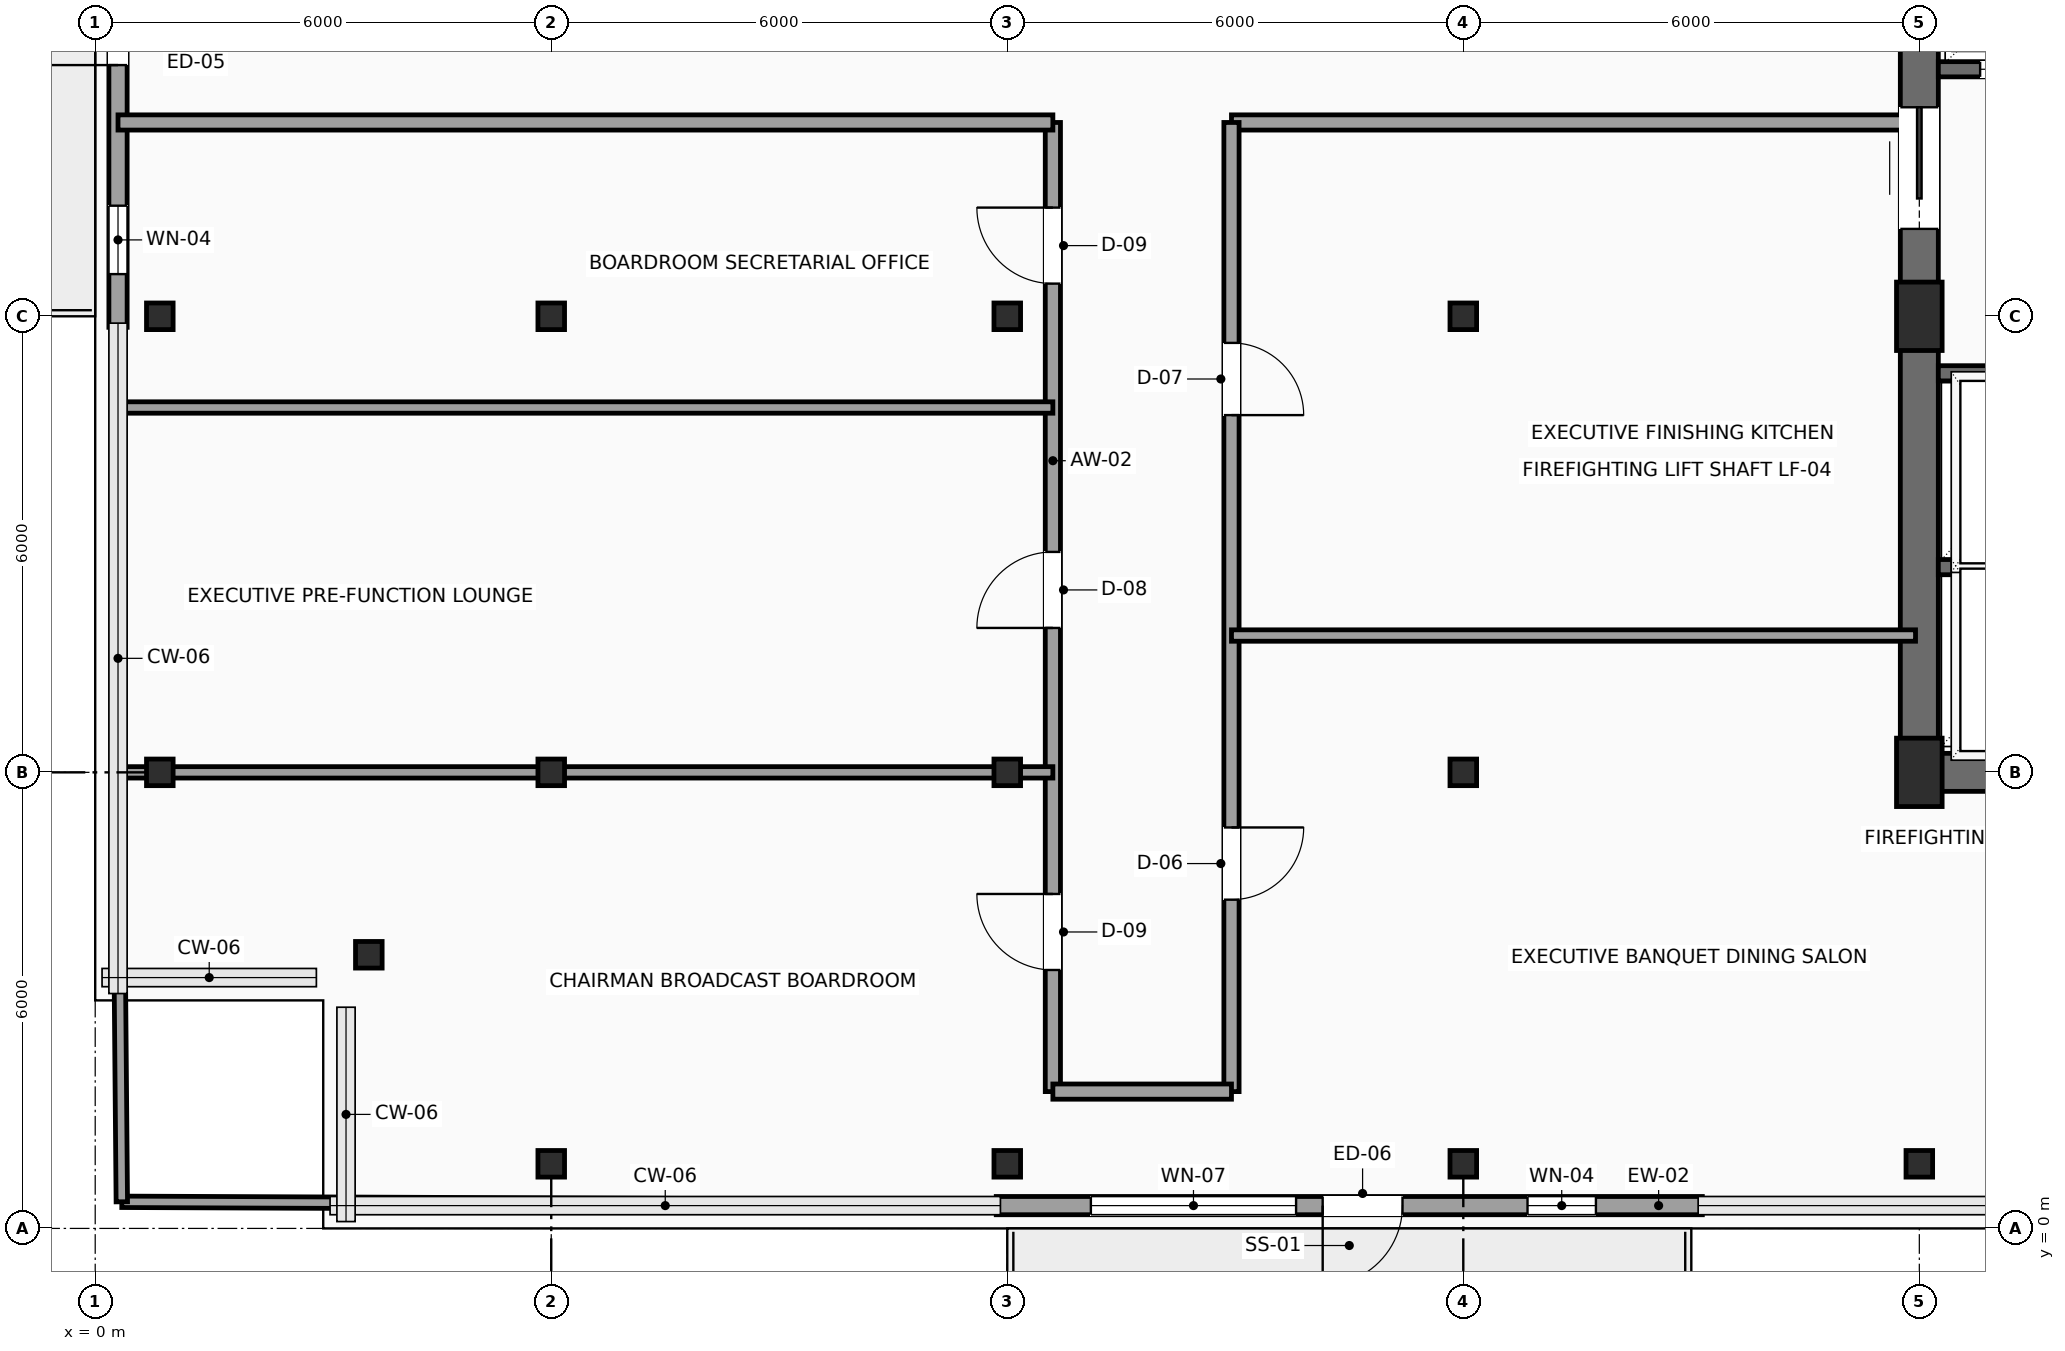
"""IFC4 building model, lengths in metres.
Left out: names, types, materials, properties, quantities, classifications, styles, units other than length and angle.
Written with IfcOpenShell. Run it as: python <this file> out.ifc"""

import sys

from ifc_helpers import new_model, si_unit, direction, frame, frame_2d, origin, origin_2d, place, context, subcontext, project, spatial, rectangle, hollow_rectangle, extrude, element, fill, save


model = new_model("IFC4")
c1 = context("Model", 3, precision=1e-05, world=origin(), true_north=direction((0.0, 1.0)))
c2 = subcontext(c1, "Body", "Model", "MODEL_VIEW")
j1 = project(units=[si_unit("LENGTHUNIT", "METRE"), si_unit("PLANEANGLEUNIT", "RADIAN")], contexts=[c1])
p1 = place(None, origin())
s1 = spatial("IfcSite", under=j1, at=p1, CompositionType="ELEMENT")
p2 = place(p1, origin())
s2 = spatial("IfcBuilding", under=s1, at=p2, CompositionType="ELEMENT")
p3 = place(p2, frame((0.0, 0.0, 292.2)))
s3 = spatial("IfcBuildingStorey", under=s2, at=p3, CompositionType="ELEMENT", Elevation=292.2)
for number, where, z_axis, x_axis in (
    (1, (24.0, 6.0, 0.0), (0.0, 0.0, 1.0), (1.0, 0.0, 0.0)),
    (2, (24.0, 12.0, 0.0), (0.0, 0.0, 1.0), (1.0, 0.0, 0.0)),
):
    element("IfcColumn", number, at=place(p3, frame(where, z_axis=z_axis, x_axis=x_axis)), inside=s3, PredefinedType="COLUMN", context=c2, shape_type="SweptSolid", body=[
        extrude(rectangle(XDim=0.6, YDim=0.9, at=origin_2d()), origin(), (0.0, 0.0, 1.0), 4.2),
    ])
for number, where, z_axis, x_axis in (
    (3, (3.6, 3.6, 0.0), (0.0, 0.0, 1.0), (1.0, 0.0, 0.0)),
    (4, (0.85, 6.0, 0.0), (0.0, 0.0, 1.0), (1.0, 0.0, 0.0)),
    (5, (0.85, 12.0, 0.0), (0.0, 0.0, 1.0), (1.0, 0.0, 0.0)),
    (6, (6.0, 0.85, 0.0), (0.0, 0.0, 1.0), (1.0, 0.0, 0.0)),
    (7, (6.0, 6.0, 0.0), (0.0, 0.0, 1.0), (1.0, 0.0, 0.0)),
    (8, (6.0, 12.0, 0.0), (0.0, 0.0, 1.0), (1.0, 0.0, 0.0)),
    (9, (12.0, 0.85, 0.0), (0.0, 0.0, 1.0), (1.0, 0.0, 0.0)),
    (10, (12.0, 6.0, 0.0), (0.0, 0.0, 1.0), (1.0, 0.0, 0.0)),
    (11, (12.0, 12.0, 0.0), (0.0, 0.0, 1.0), (1.0, 0.0, 0.0)),
    (12, (18.0, 0.85, 0.0), (0.0, 0.0, 1.0), (1.0, 0.0, 0.0)),
    (13, (18.0, 6.0, 0.0), (0.0, 0.0, 1.0), (1.0, 0.0, 0.0)),
    (14, (18.0, 12.0, 0.0), (0.0, 0.0, 1.0), (1.0, 0.0, 0.0)),
    (15, (24.0, 0.85, 0.0), (0.0, 0.0, 1.0), (1.0, 0.0, 0.0)),
):
    element("IfcColumn", number, at=place(p3, frame(where, z_axis=z_axis, x_axis=x_axis)), inside=s3, PredefinedType="COLUMN", context=c2, shape_type="SweptSolid", body=[
        extrude(hollow_rectangle(XDim=0.35, YDim=0.35, WallThickness=0.016, InnerFilletRadius=0.016, OuterFilletRadius=0.032, at=origin_2d()), origin(), (0.0, 0.0, 1.0), 4.2),
    ])
p4 = place(p3, frame((21.145, 0.3, 0.0), z_axis=(0.0, 0.0, 1.0), x_axis=(-1.0, 0.0, 0.0)))
e16 = element("IfcWall", 16, at=p4, inside=s3, PredefinedType="SOLIDWALL", context=c2, shape_type="SweptSolid", body=[
    extrude(rectangle(XDim=9.29, YDim=0.24, at=frame_2d((4.645, 0.0))), origin(), (0.0, 0.0, 1.0), 4.0),
])
p5 = place(p4, frame((3.945, 0.0, 0.0)))
e17 = element("IfcOpeningElement", 17, at=p5, cuts=e16, PredefinedType="OPENING", context=c2, shape_type="SweptSolid", body=[
    extrude(rectangle(XDim=1.05, YDim=2.2, at=frame_2d((0.525, 1.1))), frame((0.0, 0.13, 0.0), z_axis=(0.0, -1.0, 0.0), x_axis=(1.0, 0.0, 0.0)), (0.0, 0.0, 1.0), 0.26),
])
p6 = place(p4, frame((5.345, 0.0, 0.6)))
e18 = element("IfcOpeningElement", 18, at=p6, cuts=e16, PredefinedType="OPENING", context=c2, shape_type="SweptSolid", body=[
    extrude(rectangle(XDim=2.7, YDim=2.3, at=frame_2d((1.35, 1.15))), frame((0.0, 0.13, 0.0), z_axis=(0.0, -1.0, 0.0), x_axis=(1.0, 0.0, 0.0)), (0.0, 0.0, 1.0), 0.26),
])
p7 = place(p4, frame((1.4, 0.0, 0.6)))
e19 = element("IfcOpeningElement", 19, at=p7, cuts=e16, PredefinedType="OPENING", context=c2, shape_type="SweptSolid", body=[
    extrude(rectangle(XDim=0.9, YDim=2.2, at=frame_2d((0.45, 1.1))), frame((0.0, 0.13, 0.0), z_axis=(0.0, -1.0, 0.0), x_axis=(1.0, 0.0, 0.0)), (0.0, 0.0, 1.0), 0.26),
])
p8 = place(p3, frame((0.3, 11.855, 0.0), z_axis=(0.0, 0.0, 1.0), x_axis=(0.0, 1.0, 0.0)))
e20 = element("IfcWall", 20, at=p8, inside=s3, PredefinedType="SOLIDWALL", context=c2, shape_type="SweptSolid", body=[
    extrude(rectangle(XDim=9.29, YDim=0.24, at=frame_2d((4.645, 0.0))), origin(), (0.0, 0.0, 1.0), 4.0),
])
p9 = place(p8, frame((3.45, 0.0, 0.0)))
e21 = element("IfcOpeningElement", 21, at=p9, cuts=e20, PredefinedType="OPENING", context=c2, shape_type="SweptSolid", body=[
    extrude(rectangle(XDim=1.05, YDim=2.2, at=frame_2d((0.525, 1.1))), frame((0.0, 0.13, 0.0), z_axis=(0.0, -1.0, 0.0), x_axis=(1.0, 0.0, 0.0)), (0.0, 0.0, 1.0), 0.26),
])
p10 = place(p8, frame((5.6, 0.0, 0.6)))
e22 = element("IfcOpeningElement", 22, at=p10, cuts=e20, PredefinedType="OPENING", context=c2, shape_type="SweptSolid", body=[
    extrude(rectangle(XDim=2.7, YDim=2.3, at=frame_2d((1.35, 1.15))), frame((0.0, 0.13, 0.0), z_axis=(0.0, -1.0, 0.0), x_axis=(1.0, 0.0, 0.0)), (0.0, 0.0, 1.0), 0.26),
])
p11 = place(p8, frame((0.7, 0.0, 0.6)))
e23 = element("IfcOpeningElement", 23, at=p11, cuts=e20, PredefinedType="OPENING", context=c2, shape_type="SweptSolid", body=[
    extrude(rectangle(XDim=0.9, YDim=2.2, at=frame_2d((0.45, 1.1))), frame((0.0, 0.13, 0.0), z_axis=(0.0, -1.0, 0.0), x_axis=(1.0, 0.0, 0.0)), (0.0, 0.0, 1.0), 0.26),
])
p12 = place(p3, frame((24.0, 6.0, 0.0), z_axis=(0.0, 0.0, 1.0), x_axis=(1.0, 0.0, 0.0)))
e24 = element("IfcWall", 24, at=p12, inside=s3, PredefinedType="SHEAR", context=c2, shape_type="SweptSolid", body=[
    extrude(rectangle(XDim=9.6, YDim=0.5, at=frame_2d((4.8, 0.0))), origin(), (0.0, 0.0, 1.0), 4.0),
])
p13 = place(p3, frame((24.0, 6.0, 0.0), z_axis=(0.0, 0.0, 1.0), x_axis=(0.0, 1.0, 0.0)))
e25 = element("IfcWall", 25, at=p13, inside=s3, PredefinedType="SHEAR", context=c2, shape_type="SweptSolid", body=[
    extrude(rectangle(XDim=12.0, YDim=0.5, at=frame_2d((6.0, 0.0))), origin(), (0.0, 0.0, 1.0), 4.0),
])
p14 = place(p13, frame((7.15, 0.0, 0.0)))
e26 = element("IfcOpeningElement", 26, at=p14, cuts=e25, PredefinedType="OPENING", context=c2, shape_type="SweptSolid", body=[
    extrude(rectangle(XDim=1.6, YDim=2.3, at=frame_2d((0.8, 1.15))), frame((0.0, 0.26, 0.0), z_axis=(0.0, -1.0, 0.0), x_axis=(1.0, 0.0, 0.0)), (0.0, 0.0, 1.0), 0.52),
])
for number, where, z_axis, x_axis in (
    (27, (24.25, 8.7, 0.0), (0.0, 0.0, 1.0), (1.0, 0.0, 0.0)),
    (28, (24.25, 11.25, 0.0), (0.0, 0.0, 1.0), (1.0, 0.0, 0.0)),
):
    element("IfcWall", number, at=place(p3, frame(where, z_axis=z_axis, x_axis=x_axis)), inside=s3, PredefinedType="SHEAR", context=c2, shape_type="SweptSolid", body=[
        extrude(rectangle(XDim=2.17, YDim=0.2, at=frame_2d((1.085, 0.0))), origin(), (0.0, 0.0, 1.0), 4.0),
    ])
p15 = place(p3, frame((24.25, 15.25, 0.0), z_axis=(0.0, 0.0, 1.0), x_axis=(1.0, 0.0, 0.0)))
e29 = element("IfcWall", 29, at=p15, inside=s3, PredefinedType="SHEAR", context=c2, shape_type="SweptSolid", body=[
    extrude(rectangle(XDim=5.2, YDim=0.2, at=frame_2d((2.6, 0.0))), origin(), (0.0, 0.0, 1.0), 4.0),
])
p16 = place(p15, frame((0.55, 0.0, 0.0)))
e30 = element("IfcOpeningElement", 30, at=p16, cuts=e29, PredefinedType="OPENING", context=c2, shape_type="SweptSolid", body=[
    extrude(rectangle(XDim=1.2, YDim=2.2, at=frame_2d((0.6, 1.1))), frame((0.0, 0.11, 0.0), z_axis=(0.0, -1.0, 0.0), x_axis=(1.0, 0.0, 0.0)), (0.0, 0.0, 1.0), 0.22),
])
p17 = place(p15, frame((3.15, 0.0, 0.0)))
e31 = element("IfcOpeningElement", 31, at=p17, cuts=e29, PredefinedType="OPENING", context=c2, shape_type="SweptSolid", body=[
    extrude(rectangle(XDim=1.2, YDim=2.2, at=frame_2d((0.6, 1.1))), frame((0.0, 0.11, 0.0), z_axis=(0.0, -1.0, 0.0), x_axis=(1.0, 0.0, 0.0)), (0.0, 0.0, 1.0), 0.22),
])
p18 = place(p3, frame((12.6, 1.8, 0.0), z_axis=(0.0, 0.0, 1.0), x_axis=(0.0, 1.0, 0.0)))
e32 = element("IfcWall", 32, at=p18, inside=s3, PredefinedType="PARTITIONING", context=c2, shape_type="SweptSolid", body=[
    extrude(rectangle(XDim=12.75, YDim=0.2, at=frame_2d((6.375, 0.0))), origin(), (0.0, 0.0, 1.0), 4.0),
])
p19 = place(p18, frame((1.6, 0.0, 0.0)))
e33 = element("IfcOpeningElement", 33, at=p19, cuts=e32, PredefinedType="OPENING", context=c2, shape_type="SweptSolid", body=[
    extrude(rectangle(XDim=1.0, YDim=2.2, at=frame_2d((0.5, 1.1))), frame((0.0, 0.11, 0.0), z_axis=(0.0, -1.0, 0.0), x_axis=(1.0, 0.0, 0.0)), (0.0, 0.0, 1.0), 0.22),
])
p20 = place(p18, frame((6.1, 0.0, 0.0)))
e34 = element("IfcOpeningElement", 34, at=p20, cuts=e32, PredefinedType="OPENING", context=c2, shape_type="SweptSolid", body=[
    extrude(rectangle(XDim=1.0, YDim=2.2, at=frame_2d((0.5, 1.1))), frame((0.0, 0.11, 0.0), z_axis=(0.0, -1.0, 0.0), x_axis=(1.0, 0.0, 0.0)), (0.0, 0.0, 1.0), 0.22),
])
p21 = place(p18, frame((10.63, 0.0, 0.0)))
e35 = element("IfcOpeningElement", 35, at=p21, cuts=e32, PredefinedType="OPENING", context=c2, shape_type="SweptSolid", body=[
    extrude(rectangle(XDim=1.0, YDim=2.2, at=frame_2d((0.5, 1.1))), frame((0.0, 0.11, 0.0), z_axis=(0.0, -1.0, 0.0), x_axis=(1.0, 0.0, 0.0)), (0.0, 0.0, 1.0), 0.22),
])
p22 = place(p3, frame((12.6, 14.55, 0.0), z_axis=(0.0, 0.0, 1.0), x_axis=(-1.0, 0.0, 0.0)))
e36 = element("IfcWall", 36, at=p22, inside=s3, PredefinedType="PARTITIONING", context=c2, shape_type="SweptSolid", body=[
    extrude(rectangle(XDim=12.3, YDim=0.2, at=frame_2d((6.15, 0.0))), origin(), (0.0, 0.0, 1.0), 4.0),
])
p23 = place(p3, frame((23.95, 14.55, 0.0), z_axis=(0.0, 0.0, 1.0), x_axis=(-1.0, 0.0, 0.0)))
e37 = element("IfcWall", 37, at=p23, inside=s3, PredefinedType="PARTITIONING", context=c2, shape_type="SweptSolid", body=[
    extrude(rectangle(XDim=9.0, YDim=0.2, at=frame_2d((4.5, 0.0))), origin(), (0.0, 0.0, 1.0), 4.0),
])
p24 = place(p3, frame((14.95, 14.55, 0.0), z_axis=(0.0, 0.0, 1.0), x_axis=(0.0, -1.0, 0.0)))
e38 = element("IfcWall", 38, at=p24, inside=s3, PredefinedType="PARTITIONING", context=c2, shape_type="SweptSolid", body=[
    extrude(rectangle(XDim=12.75, YDim=0.2, at=frame_2d((6.375, 0.0))), origin(), (0.0, 0.0, 1.0), 4.0),
])
p25 = place(p24, frame((9.275, 0.0, 0.0)))
e39 = element("IfcOpeningElement", 39, at=p25, cuts=e38, PredefinedType="OPENING", context=c2, shape_type="SweptSolid", body=[
    extrude(rectangle(XDim=0.95, YDim=2.15, at=frame_2d((0.475, 1.075))), frame((0.0, 0.11, 0.0), z_axis=(0.0, -1.0, 0.0), x_axis=(1.0, 0.0, 0.0)), (0.0, 0.0, 1.0), 0.22),
])
p26 = place(p24, frame((2.9, 0.0, 0.0)))
e40 = element("IfcOpeningElement", 40, at=p26, cuts=e38, PredefinedType="OPENING", context=c2, shape_type="SweptSolid", body=[
    extrude(rectangle(XDim=0.95, YDim=2.15, at=frame_2d((0.475, 1.075))), frame((0.0, 0.11, 0.0), z_axis=(0.0, -1.0, 0.0), x_axis=(1.0, 0.0, 0.0)), (0.0, 0.0, 1.0), 0.22),
])
p27 = place(p3, frame((14.95, 1.8, 0.0), z_axis=(0.0, 0.0, 1.0), x_axis=(-1.0, 0.0, 0.0)))
e41 = element("IfcWall", 41, at=p27, inside=s3, PredefinedType="PARTITIONING", context=c2, shape_type="SweptSolid", body=[
    extrude(rectangle(XDim=2.35, YDim=0.2, at=frame_2d((1.175, 0.0))), origin(), (0.0, 0.0, 1.0), 4.0),
])
p28 = place(p3, frame((0.35, 0.35, 0.0), z_axis=(0.0, 0.0, 1.0), x_axis=(0.999991613227, -0.004095543276, 0.0)))
e42 = element("IfcWall", 42, at=p28, inside=s3, PredefinedType="PARTITIONING", context=c2, shape_type="SweptSolid", body=[
    extrude(rectangle(XDim=11.505, YDim=0.15, at=frame_2d((5.752, 0.0))), origin(), (0.0, 0.0, 1.0), 4.0),
])
p29 = place(p3, frame((0.3, 6.0, 0.0), z_axis=(0.0, 0.0, 1.0), x_axis=(1.0, 0.0, 0.0)))
e43 = element("IfcWall", 43, at=p29, inside=s3, PredefinedType="PARTITIONING", context=c2, shape_type="SweptSolid", body=[
    extrude(rectangle(XDim=12.3, YDim=0.15, at=frame_2d((6.15, 0.0))), origin(), (0.0, 0.0, 1.0), 3.692),
])
p30 = place(p3, frame((0.35, 0.35, 0.0), z_axis=(0.0, 0.0, 1.0), x_axis=(-0.00885800524, 0.999960767102, 0.0)))
e44 = element("IfcWall", 44, at=p30, inside=s3, PredefinedType="PARTITIONING", context=c2, shape_type="SweptSolid", body=[
    extrude(rectangle(XDim=5.65, YDim=0.15, at=frame_2d((2.825, 0.0))), origin(), (0.0, 0.0, 1.0), 4.0),
])
p31 = place(p3, frame((0.3, 10.8, 0.0), z_axis=(0.0, 0.0, 1.0), x_axis=(1.0, 0.0, 0.0)))
e45 = element("IfcWall", 45, at=p31, inside=s3, PredefinedType="PARTITIONING", context=c2, shape_type="SweptSolid", body=[
    extrude(rectangle(XDim=12.3, YDim=0.15, at=frame_2d((6.15, 0.0))), origin(), (0.0, 0.0, 1.0), 4.0),
])
p32 = place(p3, frame((14.95, 7.8, 0.0), z_axis=(0.0, 0.0, 1.0), x_axis=(1.0, 0.0, 0.0)))
e46 = element("IfcWall", 46, at=p32, inside=s3, PredefinedType="PARTITIONING", context=c2, shape_type="SweptSolid", body=[
    extrude(rectangle(XDim=9.0, YDim=0.15, at=frame_2d((4.5, 0.0))), origin(), (0.0, 0.0, 1.0), 4.0),
])
p33 = place(p5, origin())
e47 = element("IfcDoor", 47, at=p33, inside=s3, OperationType="SINGLE_SWING_RIGHT", PredefinedType="DOOR", context=c2, shape_type="SweptSolid", body=[
    extrude(rectangle(XDim=1.05, YDim=2.2, at=frame_2d((0.525, 1.1))), frame((0.0, 0.025, 0.0), z_axis=(0.0, -1.0, 0.0), x_axis=(1.0, 0.0, 0.0)), (0.0, 0.0, 1.0), 0.05),
])
fill(e17, e47)
p34 = place(p6, origin())
e48 = element("IfcWindow", 48, at=p34, inside=s3, PartitioningType="SINGLE_PANEL", PredefinedType="WINDOW", context=c2, shape_type="SweptSolid", body=[
    extrude(rectangle(XDim=2.7, YDim=2.3, at=frame_2d((1.35, 1.15))), frame((0.0, 0.03, 0.0), z_axis=(0.0, -1.0, 0.0), x_axis=(1.0, 0.0, 0.0)), (0.0, 0.0, 1.0), 0.06),
])
fill(e18, e48)
p35 = place(p7, origin())
e49 = element("IfcWindow", 49, at=p35, inside=s3, PartitioningType="SINGLE_PANEL", PredefinedType="WINDOW", context=c2, shape_type="SweptSolid", body=[
    extrude(rectangle(XDim=0.9, YDim=2.2, at=frame_2d((0.45, 1.1))), frame((0.0, 0.03, 0.0), z_axis=(0.0, -1.0, 0.0), x_axis=(1.0, 0.0, 0.0)), (0.0, 0.0, 1.0), 0.06),
])
fill(e19, e49)
p36 = place(p9, origin())
e50 = element("IfcDoor", 50, at=p36, inside=s3, OperationType="SINGLE_SWING_LEFT", PredefinedType="DOOR", context=c2, shape_type="SweptSolid", body=[
    extrude(rectangle(XDim=1.05, YDim=2.2, at=frame_2d((0.525, 1.1))), frame((0.0, 0.025, 0.0), z_axis=(0.0, -1.0, 0.0), x_axis=(1.0, 0.0, 0.0)), (0.0, 0.0, 1.0), 0.05),
])
fill(e21, e50)
p37 = place(p11, origin())
e51 = element("IfcWindow", 51, at=p37, inside=s3, PartitioningType="SINGLE_PANEL", PredefinedType="WINDOW", context=c2, shape_type="SweptSolid", body=[
    extrude(rectangle(XDim=0.9, YDim=2.2, at=frame_2d((0.45, 1.1))), frame((0.0, 0.03, 0.0), z_axis=(0.0, -1.0, 0.0), x_axis=(1.0, 0.0, 0.0)), (0.0, 0.0, 1.0), 0.06),
])
fill(e23, e51)
p38 = place(p14, origin())
e52 = element("IfcDoor", 52, at=p38, inside=s3, OperationType="DOUBLE_DOOR_SLIDING", PredefinedType="DOOR", context=c2, shape_type="SweptSolid", body=[
    extrude(rectangle(XDim=1.6, YDim=2.3, at=frame_2d((0.8, 1.15))), frame((0.0, 0.025, 0.0), z_axis=(0.0, -1.0, 0.0), x_axis=(1.0, 0.0, 0.0)), (0.0, 0.0, 1.0), 0.05),
])
fill(e26, e52)
p39 = place(p16, origin())
e53 = element("IfcDoor", 53, at=p39, inside=s3, OperationType="SLIDING_TO_RIGHT", PredefinedType="DOOR", context=c2, shape_type="SweptSolid", body=[
    extrude(rectangle(XDim=1.2, YDim=2.2, at=frame_2d((0.6, 1.1))), frame((0.0, 0.025, 0.0), z_axis=(0.0, -1.0, 0.0), x_axis=(1.0, 0.0, 0.0)), (0.0, 0.0, 1.0), 0.05),
])
fill(e30, e53)
p40 = place(p19, origin())
e54 = element("IfcDoor", 54, at=p40, inside=s3, OperationType="SINGLE_SWING_RIGHT", PredefinedType="DOOR", context=c2, shape_type="SweptSolid", body=[
    extrude(rectangle(XDim=1.0, YDim=2.2, at=frame_2d((0.5, 1.1))), frame((0.0, 0.025, 0.0), z_axis=(0.0, -1.0, 0.0), x_axis=(1.0, 0.0, 0.0)), (0.0, 0.0, 1.0), 0.05),
])
fill(e33, e54)
p41 = place(p20, origin())
e55 = element("IfcDoor", 55, at=p41, inside=s3, OperationType="SINGLE_SWING_LEFT", PredefinedType="DOOR", context=c2, shape_type="SweptSolid", body=[
    extrude(rectangle(XDim=1.0, YDim=2.2, at=frame_2d((0.5, 1.1))), frame((0.0, 0.025, 0.0), z_axis=(0.0, -1.0, 0.0), x_axis=(1.0, 0.0, 0.0)), (0.0, 0.0, 1.0), 0.05),
])
fill(e34, e55)
p42 = place(p21, origin())
e56 = element("IfcDoor", 56, at=p42, inside=s3, OperationType="SINGLE_SWING_RIGHT", PredefinedType="DOOR", context=c2, shape_type="SweptSolid", body=[
    extrude(rectangle(XDim=1.0, YDim=2.2, at=frame_2d((0.5, 1.1))), frame((0.0, 0.025, 0.0), z_axis=(0.0, -1.0, 0.0), x_axis=(1.0, 0.0, 0.0)), (0.0, 0.0, 1.0), 0.05),
])
fill(e35, e56)
p43 = place(p25, origin())
e57 = element("IfcDoor", 57, at=p43, inside=s3, OperationType="SINGLE_SWING_LEFT", PredefinedType="DOOR", context=c2, shape_type="SweptSolid", body=[
    extrude(rectangle(XDim=0.95, YDim=2.15, at=frame_2d((0.475, 1.075))), frame((0.0, 0.025, 0.0), z_axis=(0.0, -1.0, 0.0), x_axis=(1.0, 0.0, 0.0)), (0.0, 0.0, 1.0), 0.05),
])
fill(e39, e57)
p44 = place(p26, origin())
e58 = element("IfcDoor", 58, at=p44, inside=s3, OperationType="SINGLE_SWING_RIGHT", PredefinedType="DOOR", context=c2, shape_type="SweptSolid", body=[
    extrude(rectangle(XDim=0.95, YDim=2.15, at=frame_2d((0.475, 1.075))), frame((0.0, 0.025, 0.0), z_axis=(0.0, -1.0, 0.0), x_axis=(1.0, 0.0, 0.0)), (0.0, 0.0, 1.0), 0.05),
])
fill(e40, e58)
save(model, sys.argv[1])
